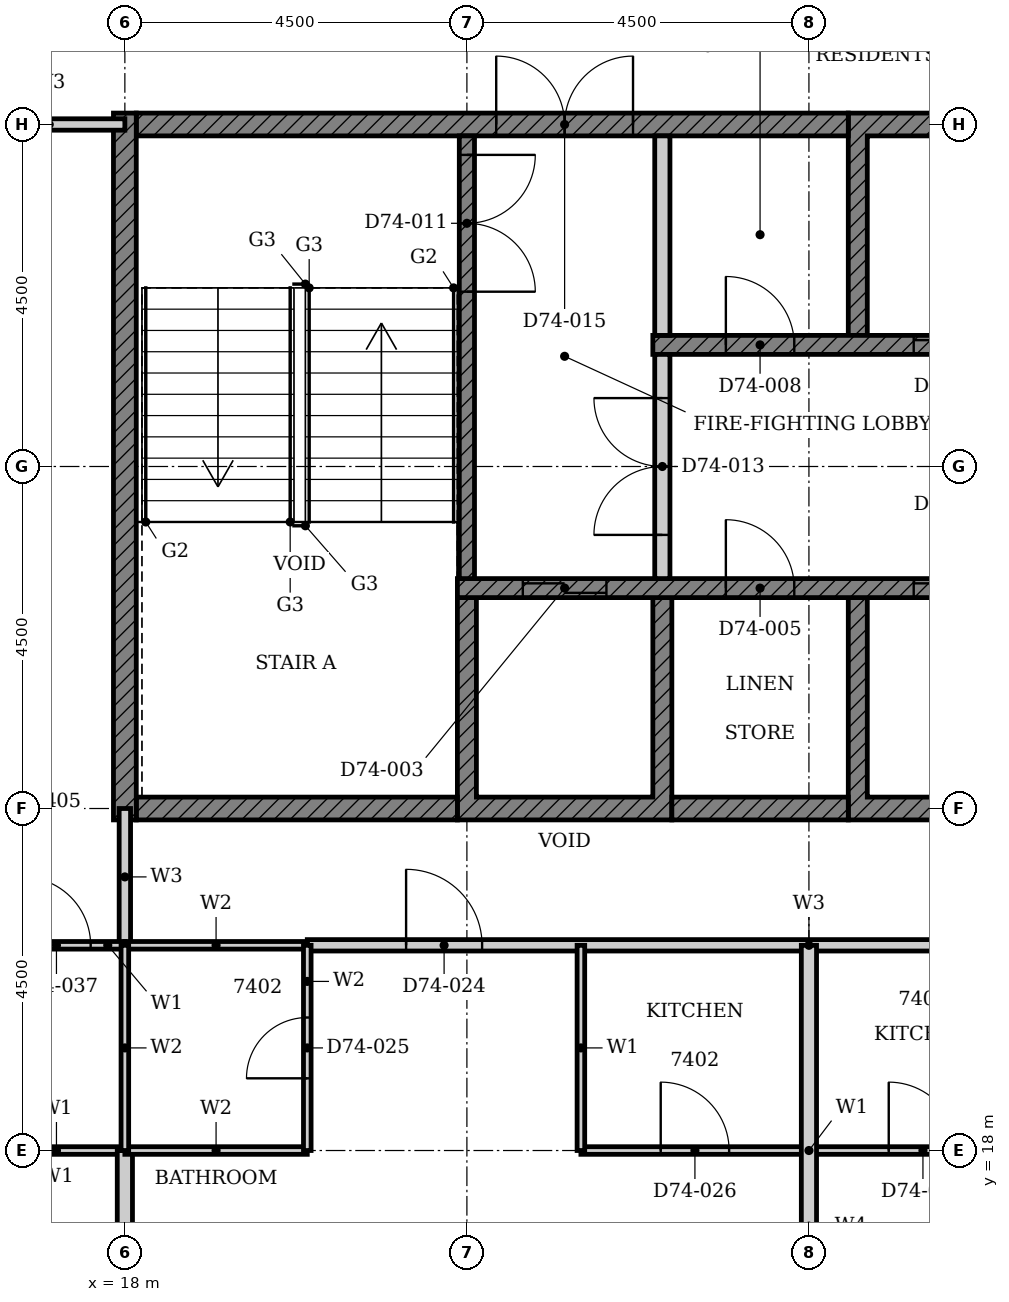
"""IFC4 building model, lengths in metres.
Left out: names, types, materials, properties, quantities, classifications, styles, units other than length and angle.
Written with IfcOpenShell. Run it as: python <this file> out.ifc"""

import sys

from ifc_helpers import new_model, si_unit, direction, frame, frame_2d, origin, place, context, subcontext, project, spatial, polyline, rectangle, outline, extrude, element, fill, save


model = new_model("IFC4")
c1 = context("Model", 3, precision=1e-05, world=origin(), true_north=direction((0.0, 1.0)))
c2 = subcontext(c1, "Body", "Model", "MODEL_VIEW")
j1 = project(units=[si_unit("LENGTHUNIT", "METRE"), si_unit("PLANEANGLEUNIT", "RADIAN")], contexts=[c1])
p1 = place(None, origin())
s1 = spatial("IfcSite", under=j1, at=p1, CompositionType="ELEMENT")
p2 = place(p1, origin())
s2 = spatial("IfcBuilding", under=s1, at=p2, CompositionType="ELEMENT")
p3 = place(p2, frame((0.0, 0.0, 290.8)))
s3 = spatial("IfcBuildingStorey", under=s2, at=p3, CompositionType="ELEMENT", Elevation=290.8)
p4 = place(p3, origin())
e1 = element("IfcWall", 1, at=p4, inside=s3, PredefinedType="SHEAR", context=c2, shape_type="SweptSolid", body=[
    extrude(outline(polyline([(22.375, 22.35), (25.197, 22.35), (25.197, 25.275), (24.947, 25.275), (24.947, 22.65), (22.625, 22.65), (22.625, 25.275), (22.375, 25.275), (22.375, 22.35)])), origin(), (0.0, 0.0, 1.0), 3.4),
])
p5 = place(p3, origin())
e2 = element("IfcWall", 2, at=p5, inside=s3, PredefinedType="SHEAR", context=c2, shape_type="SweptSolid", body=[
    extrude(outline(polyline([(27.518, 22.35), (30.339, 22.35), (30.339, 25.275), (30.089, 25.275), (30.089, 22.65), (27.768, 22.65), (27.768, 25.275), (27.518, 25.275), (27.518, 22.35)])), origin(), (0.0, 0.0, 1.0), 3.4),
])
p6 = place(p3, origin())
e3 = element("IfcWall", 3, at=p6, inside=s3, PredefinedType="SHEAR", context=c2, shape_type="SweptSolid", body=[
    extrude(outline(polyline([(27.518, 28.725), (27.768, 28.725), (27.768, 31.35), (30.089, 31.35), (30.089, 28.725), (30.339, 28.725), (30.339, 31.65), (27.518, 31.65), (27.518, 28.725)])), origin(), (0.0, 0.0, 1.0), 3.4),
])
p7 = place(p3, frame((18.15, 22.5, 0.0), z_axis=(0.0, 0.0, 1.0), x_axis=(1.0, 0.0, 0.0)))
e4 = element("IfcWall", 4, at=p7, inside=s3, PredefinedType="SHEAR", context=c2, shape_type="SweptSolid", body=[
    extrude(rectangle(XDim=4.225, YDim=0.3, at=frame_2d((2.113, 0.0))), origin(), (0.0, 0.0, 1.0), 3.4),
])
p8 = place(p3, frame((25.197, 22.5, 0.0), z_axis=(0.0, 0.0, 1.0), x_axis=(1.0, 0.0, 0.0)))
e5 = element("IfcWall", 5, at=p8, inside=s3, PredefinedType="SHEAR", context=c2, shape_type="SweptSolid", body=[
    extrude(rectangle(XDim=2.321, YDim=0.3, at=frame_2d((1.161, 0.0))), origin(), (0.0, 0.0, 1.0), 3.4),
])
p9 = place(p3, frame((18.15, 31.5, 0.0), z_axis=(0.0, 0.0, 1.0), x_axis=(1.0, 0.0, 0.0)))
e6 = element("IfcWall", 6, at=p9, inside=s3, PredefinedType="SHEAR", context=c2, shape_type="SweptSolid", body=[
    extrude(rectangle(XDim=9.368, YDim=0.3, at=frame_2d((4.684, 0.0))), origin(), (0.0, 0.0, 1.0), 3.4),
])
p10 = place(p9, frame((4.736, 0.0, 0.0)))
e7 = element("IfcOpeningElement", 7, at=p10, cuts=e6, PredefinedType="OPENING", context=c2, shape_type="SweptSolid", body=[
    extrude(rectangle(XDim=1.8, YDim=2.1, at=frame_2d((0.9, 1.05))), frame((0.0, 0.16, 0.0), z_axis=(0.0, -1.0, 0.0), x_axis=(1.0, 0.0, 0.0)), (0.0, 0.0, 1.0), 0.32),
])
p11 = place(p3, frame((18.0, 22.35, 0.0), z_axis=(0.0, 0.0, 1.0), x_axis=(0.0, 1.0, 0.0)))
e8 = element("IfcWall", 8, at=p11, inside=s3, PredefinedType="SHEAR", context=c2, shape_type="SweptSolid", body=[
    extrude(rectangle(XDim=9.3, YDim=0.3, at=frame_2d((4.65, 0.0))), origin(), (0.0, 0.0, 1.0), 3.4),
])
p12 = place(p3, frame((22.375, 25.4, 0.0), z_axis=(0.0, 0.0, 1.0), x_axis=(1.0, 0.0, 0.0)))
e9 = element("IfcWall", 9, at=p12, inside=s3, PredefinedType="SHEAR", context=c2, shape_type="SweptSolid", body=[
    extrude(rectangle(XDim=15.678, YDim=0.25, at=frame_2d((7.839, 0.0))), origin(), (0.0, 0.0, 1.0), 3.4),
])
p13 = place(p12, frame((6.004, 0.0, 0.0)))
e10 = element("IfcOpeningElement", 10, at=p13, cuts=e9, PredefinedType="OPENING", context=c2, shape_type="SweptSolid", body=[
    extrude(rectangle(XDim=1.1, YDim=2.1, at=frame_2d((0.55, 1.05))), frame((0.0, 0.135, 0.0), z_axis=(0.0, -1.0, 0.0), x_axis=(1.0, 0.0, 0.0)), (0.0, 0.0, 1.0), 0.27),
])
p14 = place(p12, frame((0.861, 0.0, 0.0)))
e11 = element("IfcOpeningElement", 11, at=p14, cuts=e9, PredefinedType="OPENING", context=c2, shape_type="SweptSolid", body=[
    extrude(rectangle(XDim=1.1, YDim=2.1, at=frame_2d((0.55, 1.05))), frame((0.0, 0.135, 0.0), z_axis=(0.0, -1.0, 0.0), x_axis=(1.0, 0.0, 0.0)), (0.0, 0.0, 1.0), 0.27),
])
p15 = place(p12, frame((3.532, 0.0, 0.0)))
e12 = element("IfcOpeningElement", 12, at=p15, cuts=e9, PredefinedType="OPENING", context=c2, shape_type="SweptSolid", body=[
    extrude(rectangle(XDim=0.9, YDim=2.1, at=frame_2d((0.45, 1.05))), frame((0.0, 0.135, 0.0), z_axis=(0.0, -1.0, 0.0), x_axis=(1.0, 0.0, 0.0)), (0.0, 0.0, 1.0), 0.27),
])
p16 = place(p12, frame((8.675, 0.0, 0.0)))
e13 = element("IfcOpeningElement", 13, at=p16, cuts=e9, PredefinedType="OPENING", context=c2, shape_type="SweptSolid", body=[
    extrude(rectangle(XDim=0.9, YDim=2.1, at=frame_2d((0.45, 1.05))), frame((0.0, 0.135, 0.0), z_axis=(0.0, -1.0, 0.0), x_axis=(1.0, 0.0, 0.0)), (0.0, 0.0, 1.0), 0.27),
])
p17 = place(p12, frame((12.532, 0.0, 0.0)))
e14 = element("IfcOpeningElement", 14, at=p17, cuts=e9, PredefinedType="OPENING", context=c2, shape_type="SweptSolid", body=[
    extrude(rectangle(XDim=0.9, YDim=2.1, at=frame_2d((0.45, 1.05))), frame((0.0, 0.135, 0.0), z_axis=(0.0, -1.0, 0.0), x_axis=(1.0, 0.0, 0.0)), (0.0, 0.0, 1.0), 0.27),
])
p18 = place(p3, frame((24.947, 28.6, 0.0), z_axis=(0.0, 0.0, 1.0), x_axis=(1.0, 0.0, 0.0)))
e15 = element("IfcWall", 15, at=p18, inside=s3, PredefinedType="SHEAR", context=c2, shape_type="SweptSolid", body=[
    extrude(rectangle(XDim=15.678, YDim=0.25, at=frame_2d((7.839, 0.0))), origin(), (0.0, 0.0, 1.0), 3.4),
])
p19 = place(p18, frame((3.432, 0.0, 0.0)))
e16 = element("IfcOpeningElement", 16, at=p19, cuts=e15, PredefinedType="OPENING", context=c2, shape_type="SweptSolid", body=[
    extrude(rectangle(XDim=1.1, YDim=2.1, at=frame_2d((0.55, 1.05))), frame((0.0, 0.135, 0.0), z_axis=(0.0, -1.0, 0.0), x_axis=(1.0, 0.0, 0.0)), (0.0, 0.0, 1.0), 0.27),
])
p20 = place(p18, frame((13.718, 0.0, 0.0)))
e17 = element("IfcOpeningElement", 17, at=p20, cuts=e15, PredefinedType="OPENING", context=c2, shape_type="SweptSolid", body=[
    extrude(rectangle(XDim=1.1, YDim=2.1, at=frame_2d((0.55, 1.05))), frame((0.0, 0.135, 0.0), z_axis=(0.0, -1.0, 0.0), x_axis=(1.0, 0.0, 0.0)), (0.0, 0.0, 1.0), 0.27),
])
p21 = place(p18, frame((0.961, 0.0, 0.0)))
e18 = element("IfcOpeningElement", 18, at=p21, cuts=e15, PredefinedType="OPENING", context=c2, shape_type="SweptSolid", body=[
    extrude(rectangle(XDim=0.9, YDim=2.1, at=frame_2d((0.45, 1.05))), frame((0.0, 0.135, 0.0), z_axis=(0.0, -1.0, 0.0), x_axis=(1.0, 0.0, 0.0)), (0.0, 0.0, 1.0), 0.27),
])
p22 = place(p18, frame((7.389, 0.0, 0.0)))
e19 = element("IfcOpeningElement", 19, at=p22, cuts=e15, PredefinedType="OPENING", context=c2, shape_type="SweptSolid", body=[
    extrude(rectangle(XDim=0.9, YDim=2.1, at=frame_2d((0.45, 1.05))), frame((0.0, 0.135, 0.0), z_axis=(0.0, -1.0, 0.0), x_axis=(1.0, 0.0, 0.0)), (0.0, 0.0, 1.0), 0.27),
])
p23 = place(p18, frame((11.246, 0.0, 0.0)))
e20 = element("IfcOpeningElement", 20, at=p23, cuts=e15, PredefinedType="OPENING", context=c2, shape_type="SweptSolid", body=[
    extrude(rectangle(XDim=0.9, YDim=2.1, at=frame_2d((0.45, 1.05))), frame((0.0, 0.135, 0.0), z_axis=(0.0, -1.0, 0.0), x_axis=(1.0, 0.0, 0.0)), (0.0, 0.0, 1.0), 0.27),
])
p24 = place(p3, frame((25.072, 28.725, 0.0), z_axis=(0.0, 0.0, 1.0), x_axis=(0.0, 1.0, 0.0)))
e21 = element("IfcWall", 21, at=p24, inside=s3, PredefinedType="PARTITIONING", context=c2, shape_type="SweptSolid", body=[
    extrude(rectangle(XDim=2.625, YDim=0.2, at=frame_2d((1.312, 0.0))), origin(), (0.0, 0.0, 1.0), 3.4),
])
p25 = place(p3, frame((22.5, 31.35, 0.0), z_axis=(0.0, 0.0, 1.0), x_axis=(0.0, -1.0, 0.0)))
e22 = element("IfcWall", 22, at=p25, inside=s3, PredefinedType="SHEAR", context=c2, shape_type="SweptSolid", body=[
    extrude(rectangle(XDim=5.825, YDim=0.2, at=frame_2d((2.913, 0.0))), origin(), (0.0, 0.0, 1.0), 3.4),
])
p26 = place(p25, frame((0.25, 0.0, 0.0)))
e23 = element("IfcOpeningElement", 23, at=p26, cuts=e22, PredefinedType="OPENING", context=c2, shape_type="SweptSolid", body=[
    extrude(rectangle(XDim=1.8, YDim=2.1, at=frame_2d((0.9, 1.05))), frame((0.0, 0.11, 0.0), z_axis=(0.0, -1.0, 0.0), x_axis=(1.0, 0.0, 0.0)), (0.0, 0.0, 1.0), 0.22),
])
p27 = place(p3, frame((25.072, 25.525, 0.0), z_axis=(0.0, 0.0, 1.0), x_axis=(0.0, 1.0, 0.0)))
e24 = element("IfcWall", 24, at=p27, inside=s3, PredefinedType="PARTITIONING", context=c2, shape_type="SweptSolid", body=[
    extrude(rectangle(XDim=2.95, YDim=0.2, at=frame_2d((1.475, 0.0))), origin(), (0.0, 0.0, 1.0), 3.4),
])
p28 = place(p27, frame((0.575, 0.0, 0.0)))
e25 = element("IfcOpeningElement", 25, at=p28, cuts=e24, PredefinedType="OPENING", context=c2, shape_type="SweptSolid", body=[
    extrude(rectangle(XDim=1.8, YDim=2.1, at=frame_2d((0.9, 1.05))), frame((0.0, 0.11, 0.0), z_axis=(0.0, -1.0, 0.0), x_axis=(1.0, 0.0, 0.0)), (0.0, 0.0, 1.0), 0.22),
])
p29 = place(p3, frame((20.4, 20.7, 0.0), z_axis=(0.0, 0.0, 1.0), x_axis=(1.0, 0.0, 0.0)))
e26 = element("IfcWall", 26, at=p29, inside=s3, PredefinedType="PARTITIONING", context=c2, shape_type="SweptSolid", body=[
    extrude(rectangle(XDim=13.2, YDim=0.15, at=frame_2d((6.6, 0.0))), origin(), (0.0, 0.0, 1.0), 3.4),
])
p30 = place(p29, frame((1.3, 0.0, 0.0)))
e27 = element("IfcOpeningElement", 27, at=p30, cuts=e26, PredefinedType="OPENING", context=c2, shape_type="SweptSolid", body=[
    extrude(rectangle(XDim=1.0, YDim=2.2, at=frame_2d((0.5, 1.1))), frame((0.0, 0.085, 0.0), z_axis=(0.0, -1.0, 0.0), x_axis=(1.0, 0.0, 0.0)), (0.0, 0.0, 1.0), 0.17),
])
p31 = place(p29, frame((10.9, 0.0, 0.0)))
e28 = element("IfcOpeningElement", 28, at=p31, cuts=e26, PredefinedType="OPENING", context=c2, shape_type="SweptSolid", body=[
    extrude(rectangle(XDim=1.0, YDim=2.2, at=frame_2d((0.5, 1.1))), frame((0.0, 0.085, 0.0), z_axis=(0.0, -1.0, 0.0), x_axis=(1.0, 0.0, 0.0)), (0.0, 0.0, 1.0), 0.17),
])
p32 = place(p3, frame((13.26, 31.5, 0.0), z_axis=(0.0, 0.0, 1.0), x_axis=(1.0, 0.0, 0.0)))
e29 = element("IfcWall", 29, at=p32, inside=s3, PredefinedType="PARTITIONING", context=c2, shape_type="SweptSolid", body=[
    extrude(rectangle(XDim=4.74, YDim=0.15, at=frame_2d((2.37, 0.0))), origin(), (0.0, 0.0, 1.0), 3.4),
])
p33 = place(p32, frame((1.75, 0.0, 0.0)))
e30 = element("IfcOpeningElement", 30, at=p33, cuts=e29, PredefinedType="OPENING", context=c2, shape_type="SweptSolid", body=[
    extrude(rectangle(XDim=1.0, YDim=2.2, at=frame_2d((0.5, 1.1))), frame((0.0, 0.085, 0.0), z_axis=(0.0, -1.0, 0.0), x_axis=(1.0, 0.0, 0.0)), (0.0, 0.0, 1.0), 0.17),
])
p34 = place(p3, frame((18.0, 20.7, 0.0), z_axis=(0.0, 0.0, 1.0), x_axis=(0.0, 1.0, 0.0)))
e31 = element("IfcWall", 31, at=p34, inside=s3, PredefinedType="PARTITIONING", context=c2, shape_type="SweptSolid", body=[
    extrude(rectangle(XDim=1.8, YDim=0.15, at=frame_2d((0.9, 0.0))), origin(), (0.0, 0.0, 1.0), 3.4),
])
p35 = place(p3, frame((24.0, 18.0, 0.0), z_axis=(0.0, 0.0, 1.0), x_axis=(1.0, 0.0, 0.0)))
e32 = element("IfcWall", 32, at=p35, inside=s3, PredefinedType="PARTITIONING", context=c2, shape_type="SweptSolid", body=[
    extrude(rectangle(XDim=6.0, YDim=0.1, at=frame_2d((3.0, 0.0))), origin(), (0.0, 0.0, 1.0), 3.4),
])
p36 = place(p35, frame((1.05, 0.0, 0.0)))
e33 = element("IfcOpeningElement", 33, at=p36, cuts=e32, PredefinedType="OPENING", context=c2, shape_type="SweptSolid", body=[
    extrude(rectangle(XDim=0.9, YDim=2.1, at=frame_2d((0.45, 1.05))), frame((0.0, 0.06, 0.0), z_axis=(0.0, -1.0, 0.0), x_axis=(1.0, 0.0, 0.0)), (0.0, 0.0, 1.0), 0.12),
])
p37 = place(p35, frame((4.05, 0.0, 0.0)))
e34 = element("IfcOpeningElement", 34, at=p37, cuts=e32, PredefinedType="OPENING", context=c2, shape_type="SweptSolid", body=[
    extrude(rectangle(XDim=0.9, YDim=2.1, at=frame_2d((0.45, 1.05))), frame((0.0, 0.06, 0.0), z_axis=(0.0, -1.0, 0.0), x_axis=(1.0, 0.0, 0.0)), (0.0, 0.0, 1.0), 0.12),
])
p38 = place(p3, frame((16.2, 18.0, 0.0), z_axis=(0.0, 0.0, 1.0), x_axis=(1.0, 0.0, 0.0)))
e35 = element("IfcWall", 35, at=p38, inside=s3, PredefinedType="PARTITIONING", context=c2, shape_type="SweptSolid", body=[
    extrude(rectangle(XDim=1.8, YDim=0.1, at=frame_2d((0.9, 0.0))), origin(), (0.0, 0.0, 1.0), 3.4),
])
p39 = place(p3, frame((16.2, 20.7, 0.0), z_axis=(0.0, 0.0, 1.0), x_axis=(1.0, 0.0, 0.0)))
e36 = element("IfcWall", 36, at=p39, inside=s3, PredefinedType="PARTITIONING", context=c2, shape_type="SweptSolid", body=[
    extrude(rectangle(XDim=1.8, YDim=0.1, at=frame_2d((0.9, 0.0))), origin(), (0.0, 0.0, 1.0), 3.4),
])
p40 = place(p39, frame((0.45, 0.0, 0.0)))
e37 = element("IfcOpeningElement", 37, at=p40, cuts=e36, PredefinedType="OPENING", context=c2, shape_type="SweptSolid", body=[
    extrude(rectangle(XDim=0.9, YDim=2.1, at=frame_2d((0.45, 1.05))), frame((0.0, 0.06, 0.0), z_axis=(0.0, -1.0, 0.0), x_axis=(1.0, 0.0, 0.0)), (0.0, 0.0, 1.0), 0.12),
])
p41 = place(p3, frame((24.0, 18.0, 0.0), z_axis=(0.0, 0.0, 1.0), x_axis=(0.0, 1.0, 0.0)))
e38 = element("IfcWall", 38, at=p41, inside=s3, PredefinedType="PARTITIONING", context=c2, shape_type="SweptSolid", body=[
    extrude(rectangle(XDim=2.7, YDim=0.1, at=frame_2d((1.35, 0.0))), origin(), (0.0, 0.0, 1.0), 3.4),
])
p42 = place(p3, frame((18.0, 15.8, 0.0), z_axis=(0.0, 0.0, 1.0), x_axis=(0.0, 1.0, 0.0)))
e39 = element("IfcWall", 39, at=p42, inside=s3, PredefinedType="PARTITIONING", context=c2, shape_type="SweptSolid", body=[
    extrude(rectangle(XDim=2.2, YDim=0.2, at=frame_2d((1.1, 0.0))), origin(), (0.0, 0.0, 1.0), 3.4),
])
p43 = place(p3, frame((27.0, 13.31, 0.0), z_axis=(0.0, 0.0, 1.0), x_axis=(0.0, 1.0, 0.0)))
e40 = element("IfcWall", 40, at=p43, inside=s3, PredefinedType="PARTITIONING", context=c2, shape_type="SweptSolid", body=[
    extrude(rectangle(XDim=7.39, YDim=0.2, at=frame_2d((3.695, 0.0))), origin(), (0.0, 0.0, 1.0), 3.4),
])
for number, where, z_axis, x_axis in (
    (41, (18.0, 18.0, 0.0), (0.0, 0.0, 1.0), (1.0, 0.0, 0.0)),
    (42, (18.0, 20.7, 0.0), (0.0, 0.0, 1.0), (1.0, 0.0, 0.0)),
):
    element("IfcWall", number, at=place(p3, frame(where, z_axis=z_axis, x_axis=x_axis)), inside=s3, PredefinedType="PARTITIONING", context=c2, shape_type="SweptSolid", body=[
        extrude(rectangle(XDim=2.4, YDim=0.1, at=frame_2d((1.2, 0.0))), origin(), (0.0, 0.0, 1.0), 3.4),
    ])
p44 = place(p3, frame((18.0, 18.0, 0.0), z_axis=(0.0, 0.0, 1.0), x_axis=(0.0, 1.0, 0.0)))
e43 = element("IfcWall", 43, at=p44, inside=s3, PredefinedType="PARTITIONING", context=c2, shape_type="SweptSolid", body=[
    extrude(rectangle(XDim=2.7, YDim=0.1, at=frame_2d((1.35, 0.0))), origin(), (0.0, 0.0, 1.0), 3.4),
])
p45 = place(p3, frame((20.4, 18.0, 0.0), z_axis=(0.0, 0.0, 1.0), x_axis=(0.0, 1.0, 0.0)))
e44 = element("IfcWall", 44, at=p45, inside=s3, PredefinedType="PARTITIONING", context=c2, shape_type="SweptSolid", body=[
    extrude(rectangle(XDim=2.7, YDim=0.1, at=frame_2d((1.35, 0.0))), origin(), (0.0, 0.0, 1.0), 3.4),
])
p46 = place(p45, frame((0.95, 0.0, 0.0)))
e45 = element("IfcOpeningElement", 45, at=p46, cuts=e44, PredefinedType="OPENING", context=c2, shape_type="SweptSolid", body=[
    extrude(rectangle(XDim=0.8, YDim=2.1, at=frame_2d((0.4, 1.05))), frame((0.0, 0.06, 0.0), z_axis=(0.0, -1.0, 0.0), x_axis=(1.0, 0.0, 0.0)), (0.0, 0.0, 1.0), 0.12),
])
p47 = place(p13, origin())
e46 = element("IfcDoor", 46, at=p47, inside=s3, OperationType="DOUBLE_DOOR_SLIDING", PredefinedType="DOOR", context=c2, shape_type="SweptSolid", body=[
    extrude(rectangle(XDim=1.1, YDim=2.1, at=frame_2d((0.55, 1.05))), frame((0.0, 0.025, 0.0), z_axis=(0.0, -1.0, 0.0), x_axis=(1.0, 0.0, 0.0)), (0.0, 0.0, 1.0), 0.05),
])
fill(e10, e46)
p48 = place(p19, origin())
e47 = element("IfcDoor", 47, at=p48, inside=s3, OperationType="DOUBLE_DOOR_SLIDING", PredefinedType="DOOR", context=c2, shape_type="SweptSolid", body=[
    extrude(rectangle(XDim=1.1, YDim=2.1, at=frame_2d((0.55, 1.05))), frame((0.0, 0.025, 0.0), z_axis=(0.0, -1.0, 0.0), x_axis=(1.0, 0.0, 0.0)), (0.0, 0.0, 1.0), 0.05),
])
fill(e16, e47)
p49 = place(p14, origin())
e48 = element("IfcDoor", 48, at=p49, inside=s3, OperationType="DOUBLE_DOOR_SLIDING", PredefinedType="DOOR", context=c2, shape_type="SweptSolid", body=[
    extrude(rectangle(XDim=1.1, YDim=2.1, at=frame_2d((0.55, 1.05))), frame((0.0, 0.025, 0.0), z_axis=(0.0, -1.0, 0.0), x_axis=(1.0, 0.0, 0.0)), (0.0, 0.0, 1.0), 0.05),
])
fill(e11, e48)
p50 = place(p15, origin())
e49 = element("IfcDoor", 49, at=p50, inside=s3, OperationType="SINGLE_SWING_LEFT", PredefinedType="DOOR", context=c2, shape_type="SweptSolid", body=[
    extrude(rectangle(XDim=0.9, YDim=2.1, at=frame_2d((0.45, 1.05))), frame((0.0, 0.025, 0.0), z_axis=(0.0, -1.0, 0.0), x_axis=(1.0, 0.0, 0.0)), (0.0, 0.0, 1.0), 0.05),
])
fill(e12, e49)
p51 = place(p21, origin())
e50 = element("IfcDoor", 50, at=p51, inside=s3, OperationType="SINGLE_SWING_LEFT", PredefinedType="DOOR", context=c2, shape_type="SweptSolid", body=[
    extrude(rectangle(XDim=0.9, YDim=2.1, at=frame_2d((0.45, 1.05))), frame((0.0, 0.025, 0.0), z_axis=(0.0, -1.0, 0.0), x_axis=(1.0, 0.0, 0.0)), (0.0, 0.0, 1.0), 0.05),
])
fill(e18, e50)
p52 = place(p26, origin())
e51 = element("IfcDoor", 51, at=p52, inside=s3, OperationType="DOUBLE_DOOR_SINGLE_SWING", PredefinedType="DOOR", context=c2, shape_type="SweptSolid", body=[
    extrude(rectangle(XDim=1.8, YDim=2.1, at=frame_2d((0.9, 1.05))), frame((0.0, 0.025, 0.0), z_axis=(0.0, -1.0, 0.0), x_axis=(1.0, 0.0, 0.0)), (0.0, 0.0, 1.0), 0.05),
])
fill(e23, e51)
p53 = place(p28, origin())
e52 = element("IfcDoor", 52, at=p53, inside=s3, OperationType="DOUBLE_DOOR_SINGLE_SWING", PredefinedType="DOOR", context=c2, shape_type="SweptSolid", body=[
    extrude(rectangle(XDim=1.8, YDim=2.1, at=frame_2d((0.9, 1.05))), frame((0.0, 0.025, 0.0), z_axis=(0.0, -1.0, 0.0), x_axis=(1.0, 0.0, 0.0)), (0.0, 0.0, 1.0), 0.05),
])
fill(e25, e52)
p54 = place(p10, origin())
e53 = element("IfcDoor", 53, at=p54, inside=s3, OperationType="DOUBLE_DOOR_SINGLE_SWING", PredefinedType="DOOR", context=c2, shape_type="SweptSolid", body=[
    extrude(rectangle(XDim=1.8, YDim=2.1, at=frame_2d((0.9, 1.05))), frame((0.0, 0.025, 0.0), z_axis=(0.0, -1.0, 0.0), x_axis=(1.0, 0.0, 0.0)), (0.0, 0.0, 1.0), 0.05),
])
fill(e7, e53)
p55 = place(p30, origin())
e54 = element("IfcDoor", 54, at=p55, inside=s3, OperationType="SINGLE_SWING_RIGHT", PredefinedType="DOOR", context=c2, shape_type="SweptSolid", body=[
    extrude(rectangle(XDim=1.0, YDim=2.2, at=frame_2d((0.5, 1.1))), frame((0.0, 0.025, 0.0), z_axis=(0.0, -1.0, 0.0), x_axis=(1.0, 0.0, 0.0)), (0.0, 0.0, 1.0), 0.05),
])
fill(e27, e54)
p56 = place(p46, origin())
e55 = element("IfcDoor", 55, at=p56, inside=s3, OperationType="SINGLE_SWING_LEFT", PredefinedType="DOOR", context=c2, shape_type="SweptSolid", body=[
    extrude(rectangle(XDim=0.8, YDim=2.1, at=frame_2d((0.4, 1.05))), frame((0.0, 0.025, 0.0), z_axis=(0.0, -1.0, 0.0), x_axis=(1.0, 0.0, 0.0)), (0.0, 0.0, 1.0), 0.05),
])
fill(e45, e55)
p57 = place(p36, origin())
e56 = element("IfcDoor", 56, at=p57, inside=s3, OperationType="SINGLE_SWING_RIGHT", PredefinedType="DOOR", context=c2, shape_type="SweptSolid", body=[
    extrude(rectangle(XDim=0.9, YDim=2.1, at=frame_2d((0.45, 1.05))), frame((0.0, 0.025, 0.0), z_axis=(0.0, -1.0, 0.0), x_axis=(1.0, 0.0, 0.0)), (0.0, 0.0, 1.0), 0.05),
])
fill(e33, e56)
p58 = place(p37, origin())
e57 = element("IfcDoor", 57, at=p58, inside=s3, OperationType="SINGLE_SWING_LEFT", PredefinedType="DOOR", context=c2, shape_type="SweptSolid", body=[
    extrude(rectangle(XDim=0.9, YDim=2.1, at=frame_2d((0.45, 1.05))), frame((0.0, 0.025, 0.0), z_axis=(0.0, -1.0, 0.0), x_axis=(1.0, 0.0, 0.0)), (0.0, 0.0, 1.0), 0.05),
])
fill(e34, e57)
p59 = place(p40, origin())
e58 = element("IfcDoor", 58, at=p59, inside=s3, OperationType="SINGLE_SWING_RIGHT", PredefinedType="DOOR", context=c2, shape_type="SweptSolid", body=[
    extrude(rectangle(XDim=0.9, YDim=2.1, at=frame_2d((0.45, 1.05))), frame((0.0, 0.025, 0.0), z_axis=(0.0, -1.0, 0.0), x_axis=(1.0, 0.0, 0.0)), (0.0, 0.0, 1.0), 0.05),
])
fill(e37, e58)
save(model, sys.argv[1])
